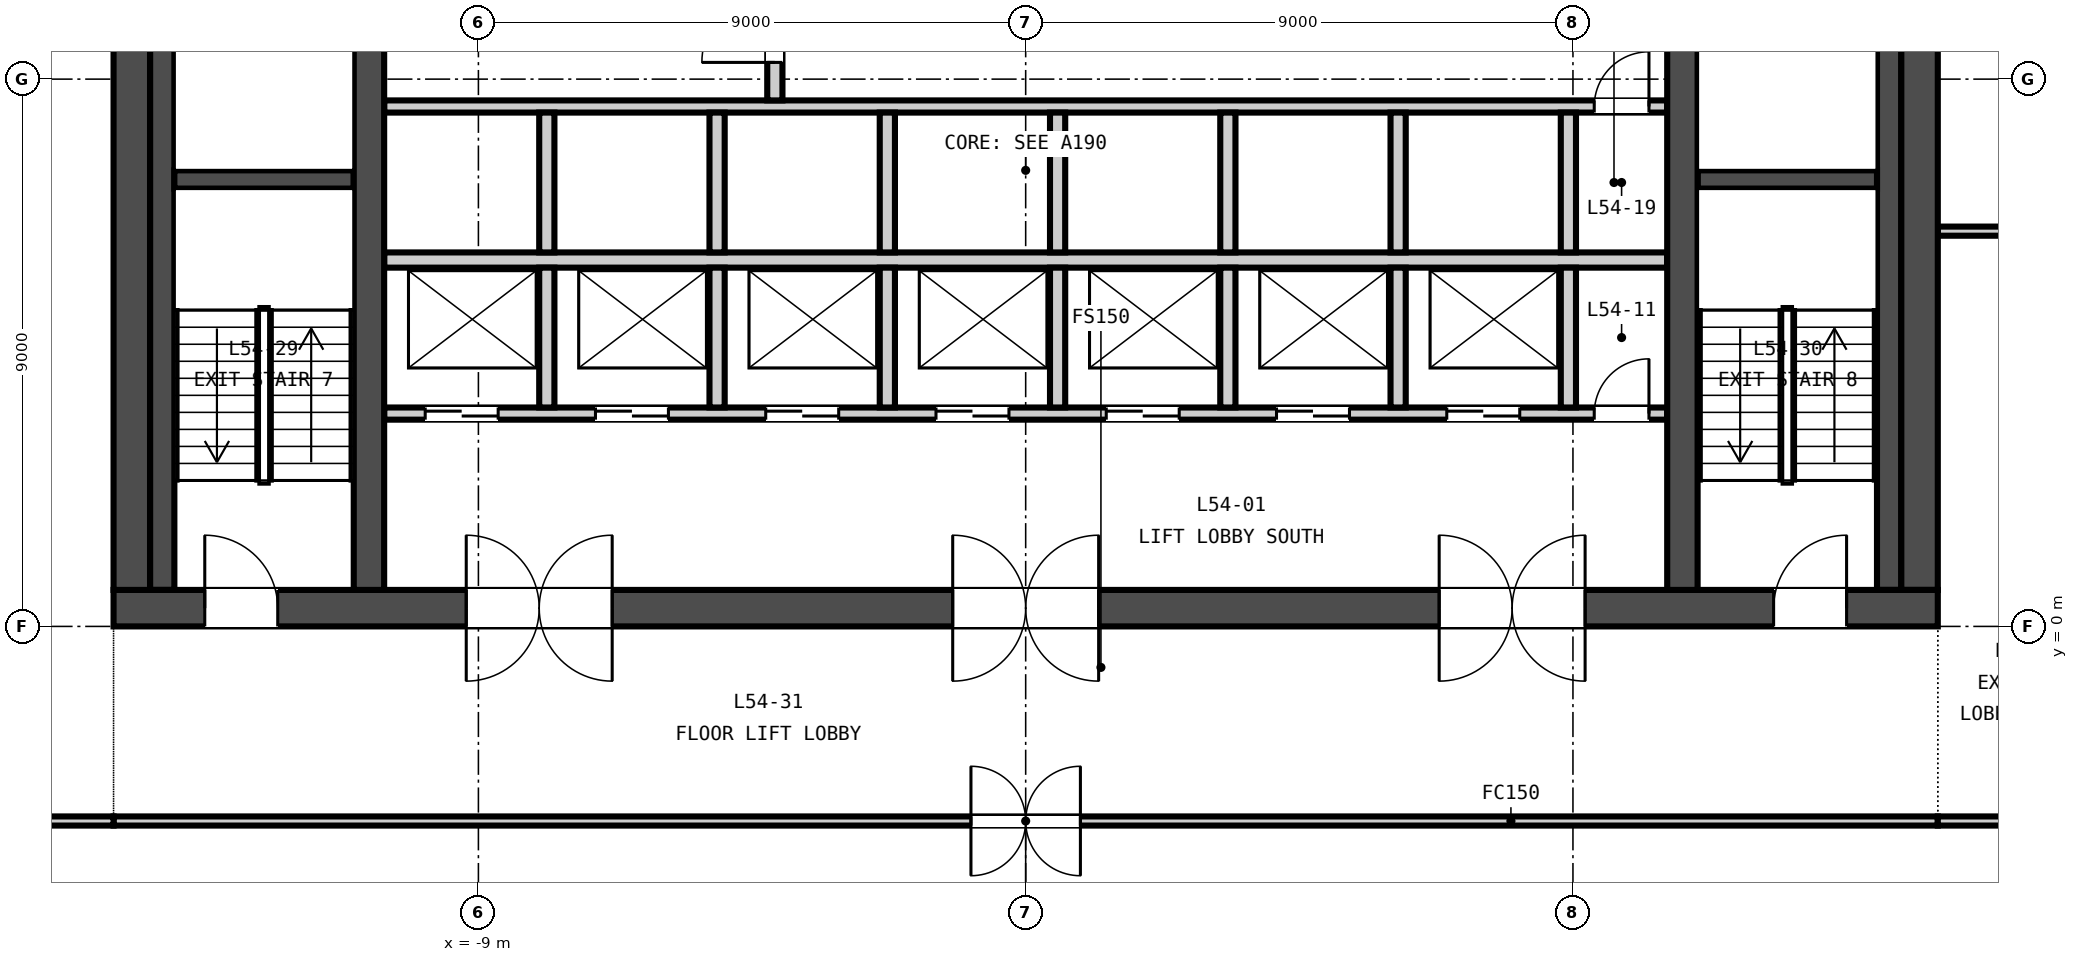
"""IFC4 building model, lengths in metres.
Left out: names, types, materials, properties, quantities, classifications, styles, units other than length and angle.
Written with IfcOpenShell. Run it as: python <this file> out.ifc"""

import sys

from ifc_helpers import new_model, si_unit, direction, frame, frame_2d, origin, place, context, subcontext, project, spatial, rectangle, extrude, element, fill, save


model = new_model("IFC4")
c1 = context("Model", 3, precision=1e-05, world=origin(), true_north=direction((0.0, 1.0)))
c2 = subcontext(c1, "Body", "Model", "MODEL_VIEW")
j1 = project(units=[si_unit("LENGTHUNIT", "METRE"), si_unit("PLANEANGLEUNIT", "RADIAN")], contexts=[c1])
p1 = place(None, origin())
s1 = spatial("IfcSite", under=j1, at=p1, CompositionType="ELEMENT")
p2 = place(p1, origin())
s2 = spatial("IfcBuilding", under=s1, at=p2, CompositionType="ELEMENT")
p3 = place(p2, frame((0.0, 0.0, 216.3)))
s3 = spatial("IfcBuildingStorey", under=s2, at=p3, CompositionType="ELEMENT", Elevation=216.3)
p4 = place(p3, frame((-15.0, 0.3, -0.15), z_axis=(0.0, 0.0, 1.0), x_axis=(1.0, 0.0, 0.0)))
e1 = element("IfcWall", 1, at=p4, inside=s3, PredefinedType="SOLIDWALL", context=c2, shape_type="SweptSolid", body=[
    extrude(rectangle(XDim=30.0, YDim=0.6, at=frame_2d((15.0, 0.0))), origin(), (0.0, 0.0, 1.0), 3.65),
])
p5 = place(p4, frame((5.8, 0.0, 0.15)))
e2 = element("IfcOpeningElement", 2, at=p5, cuts=e1, PredefinedType="OPENING", context=c2, shape_type="SweptSolid", body=[
    extrude(rectangle(XDim=2.4, YDim=2.4, at=frame_2d((1.2, 1.2))), frame((0.0, 0.31, 0.0), z_axis=(0.0, -1.0, 0.0), x_axis=(1.0, 0.0, 0.0)), (0.0, 0.0, 1.0), 0.62),
])
p6 = place(p4, frame((13.8, 0.0, 0.15)))
e3 = element("IfcOpeningElement", 3, at=p6, cuts=e1, PredefinedType="OPENING", context=c2, shape_type="SweptSolid", body=[
    extrude(rectangle(XDim=2.4, YDim=2.4, at=frame_2d((1.2, 1.2))), frame((0.0, 0.31, 0.0), z_axis=(0.0, -1.0, 0.0), x_axis=(1.0, 0.0, 0.0)), (0.0, 0.0, 1.0), 0.62),
])
p7 = place(p4, frame((21.8, 0.0, 0.15)))
e4 = element("IfcOpeningElement", 4, at=p7, cuts=e1, PredefinedType="OPENING", context=c2, shape_type="SweptSolid", body=[
    extrude(rectangle(XDim=2.4, YDim=2.4, at=frame_2d((1.2, 1.2))), frame((0.0, 0.31, 0.0), z_axis=(0.0, -1.0, 0.0), x_axis=(1.0, 0.0, 0.0)), (0.0, 0.0, 1.0), 0.62),
])
p8 = place(p4, frame((1.5, 0.0, 0.15)))
e5 = element("IfcOpeningElement", 5, at=p8, cuts=e1, PredefinedType="OPENING", context=c2, shape_type="SweptSolid", body=[
    extrude(rectangle(XDim=1.2, YDim=2.1, at=frame_2d((0.6, 1.05))), frame((0.0, 0.31, 0.0), z_axis=(0.0, -1.0, 0.0), x_axis=(1.0, 0.0, 0.0)), (0.0, 0.0, 1.0), 0.62),
])
p9 = place(p4, frame((27.3, 0.0, 0.15)))
e6 = element("IfcOpeningElement", 6, at=p9, cuts=e1, PredefinedType="OPENING", context=c2, shape_type="SweptSolid", body=[
    extrude(rectangle(XDim=1.2, YDim=2.1, at=frame_2d((0.6, 1.05))), frame((0.0, 0.31, 0.0), z_axis=(0.0, -1.0, 0.0), x_axis=(1.0, 0.0, 0.0)), (0.0, 0.0, 1.0), 0.62),
])
for number, where, z_axis, x_axis in (
    (7, (-14.7, 0.6, -0.15), (0.0, 0.0, 1.0), (0.0, 1.0, 0.0)),
    (8, (14.7, 0.6, -0.15), (0.0, 0.0, 1.0), (0.0, 1.0, 0.0)),
):
    element("IfcWall", number, at=place(p3, frame(where, z_axis=z_axis, x_axis=x_axis)), inside=s3, PredefinedType="SOLIDWALL", context=c2, shape_type="SweptSolid", body=[
        extrude(rectangle(XDim=13.8, YDim=0.6, at=frame_2d((6.9, 0.0))), origin(), (0.0, 0.0, 1.0), 3.65),
    ])
for number, where, z_axis, x_axis in (
    (9, (-10.8, 0.6, -0.15), (0.0, 0.0, 1.0), (0.0, 1.0, 0.0)),
    (10, (10.8, 0.6, -0.15), (0.0, 0.0, 1.0), (0.0, 1.0, 0.0)),
):
    element("IfcWall", number, at=place(p3, frame(where, z_axis=z_axis, x_axis=x_axis)), inside=s3, PredefinedType="SOLIDWALL", context=c2, shape_type="SweptSolid", body=[
        extrude(rectangle(XDim=13.8, YDim=0.5, at=frame_2d((6.9, 0.0))), origin(), (0.0, 0.0, 1.0), 3.65),
    ])
p10 = place(p3, frame((-10.55, 3.5, 0.0), z_axis=(0.0, 0.0, 1.0), x_axis=(1.0, 0.0, 0.0)))
e11 = element("IfcWall", 11, at=p10, inside=s3, PredefinedType="PARTITIONING", context=c2, shape_type="SweptSolid", body=[
    extrude(rectangle(XDim=21.1, YDim=0.2, at=frame_2d((10.55, 0.0))), origin(), (0.0, 0.0, 1.0), 3.5),
])
p11 = place(p10, frame((0.675, 0.0, 0.0)))
e12 = element("IfcOpeningElement", 12, at=p11, cuts=e11, PredefinedType="OPENING", context=c2, shape_type="SweptSolid", body=[
    extrude(rectangle(XDim=1.2, YDim=2.1, at=frame_2d((0.6, 1.05))), frame((0.0, 0.11, 0.0), z_axis=(0.0, -1.0, 0.0), x_axis=(1.0, 0.0, 0.0)), (0.0, 0.0, 1.0), 0.22),
])
p12 = place(p10, frame((3.475, 0.0, 0.0)))
e13 = element("IfcOpeningElement", 13, at=p12, cuts=e11, PredefinedType="OPENING", context=c2, shape_type="SweptSolid", body=[
    extrude(rectangle(XDim=1.2, YDim=2.1, at=frame_2d((0.6, 1.05))), frame((0.0, 0.11, 0.0), z_axis=(0.0, -1.0, 0.0), x_axis=(1.0, 0.0, 0.0)), (0.0, 0.0, 1.0), 0.22),
])
p13 = place(p10, frame((6.275, 0.0, 0.0)))
e14 = element("IfcOpeningElement", 14, at=p13, cuts=e11, PredefinedType="OPENING", context=c2, shape_type="SweptSolid", body=[
    extrude(rectangle(XDim=1.2, YDim=2.1, at=frame_2d((0.6, 1.05))), frame((0.0, 0.11, 0.0), z_axis=(0.0, -1.0, 0.0), x_axis=(1.0, 0.0, 0.0)), (0.0, 0.0, 1.0), 0.22),
])
p14 = place(p10, frame((9.075, 0.0, 0.0)))
e15 = element("IfcOpeningElement", 15, at=p14, cuts=e11, PredefinedType="OPENING", context=c2, shape_type="SweptSolid", body=[
    extrude(rectangle(XDim=1.2, YDim=2.1, at=frame_2d((0.6, 1.05))), frame((0.0, 0.11, 0.0), z_axis=(0.0, -1.0, 0.0), x_axis=(1.0, 0.0, 0.0)), (0.0, 0.0, 1.0), 0.22),
])
p15 = place(p10, frame((11.875, 0.0, 0.0)))
e16 = element("IfcOpeningElement", 16, at=p15, cuts=e11, PredefinedType="OPENING", context=c2, shape_type="SweptSolid", body=[
    extrude(rectangle(XDim=1.2, YDim=2.1, at=frame_2d((0.6, 1.05))), frame((0.0, 0.11, 0.0), z_axis=(0.0, -1.0, 0.0), x_axis=(1.0, 0.0, 0.0)), (0.0, 0.0, 1.0), 0.22),
])
p16 = place(p10, frame((14.675, 0.0, 0.0)))
e17 = element("IfcOpeningElement", 17, at=p16, cuts=e11, PredefinedType="OPENING", context=c2, shape_type="SweptSolid", body=[
    extrude(rectangle(XDim=1.2, YDim=2.1, at=frame_2d((0.6, 1.05))), frame((0.0, 0.11, 0.0), z_axis=(0.0, -1.0, 0.0), x_axis=(1.0, 0.0, 0.0)), (0.0, 0.0, 1.0), 0.22),
])
p17 = place(p10, frame((17.475, 0.0, 0.0)))
e18 = element("IfcOpeningElement", 18, at=p17, cuts=e11, PredefinedType="OPENING", context=c2, shape_type="SweptSolid", body=[
    extrude(rectangle(XDim=1.2, YDim=2.1, at=frame_2d((0.6, 1.05))), frame((0.0, 0.11, 0.0), z_axis=(0.0, -1.0, 0.0), x_axis=(1.0, 0.0, 0.0)), (0.0, 0.0, 1.0), 0.22),
])
p18 = place(p10, frame((19.9, 0.0, 0.0)))
e19 = element("IfcOpeningElement", 19, at=p18, cuts=e11, PredefinedType="OPENING", context=c2, shape_type="SweptSolid", body=[
    extrude(rectangle(XDim=0.9, YDim=2.1, at=frame_2d((0.45, 1.05))), frame((0.0, 0.11, 0.0), z_axis=(0.0, -1.0, 0.0), x_axis=(1.0, 0.0, 0.0)), (0.0, 0.0, 1.0), 0.22),
])
p19 = place(p3, frame((-10.55, 6.025, 0.0), z_axis=(0.0, 0.0, 1.0), x_axis=(1.0, 0.0, 0.0)))
e20 = element("IfcWall", 20, at=p19, inside=s3, PredefinedType="PARTITIONING", context=c2, shape_type="SweptSolid", body=[
    extrude(rectangle(XDim=21.1, YDim=0.25, at=frame_2d((10.55, 0.0))), origin(), (0.0, 0.0, 1.0), 3.5),
])
p20 = place(p3, frame((-10.55, 8.55, 0.0), z_axis=(0.0, 0.0, 1.0), x_axis=(1.0, 0.0, 0.0)))
e21 = element("IfcWall", 21, at=p20, inside=s3, PredefinedType="PARTITIONING", context=c2, shape_type="SweptSolid", body=[
    extrude(rectangle(XDim=21.1, YDim=0.2, at=frame_2d((10.55, 0.0))), origin(), (0.0, 0.0, 1.0), 3.5),
])
p21 = place(p20, frame((19.9, 0.0, 0.0)))
e22 = element("IfcOpeningElement", 22, at=p21, cuts=e21, PredefinedType="OPENING", context=c2, shape_type="SweptSolid", body=[
    extrude(rectangle(XDim=0.9, YDim=2.1, at=frame_2d((0.45, 1.05))), frame((0.0, 0.11, 0.0), z_axis=(0.0, -1.0, 0.0), x_axis=(1.0, 0.0, 0.0)), (0.0, 0.0, 1.0), 0.22),
])
p22 = place(p3, frame((-4.125, 8.65, 0.0), z_axis=(0.0, 0.0, 1.0), x_axis=(0.0, 1.0, 0.0)))
e23 = element("IfcWall", 23, at=p22, inside=s3, PredefinedType="PARTITIONING", context=c2, shape_type="SweptSolid", body=[
    extrude(rectangle(XDim=2.45, YDim=0.25, at=frame_2d((1.225, 0.0))), origin(), (0.0, 0.0, 1.0), 3.5),
])
p23 = place(p22, frame((0.625, 0.0, 0.0)))
e24 = element("IfcOpeningElement", 24, at=p23, cuts=e23, PredefinedType="OPENING", context=c2, shape_type="SweptSolid", body=[
    extrude(rectangle(XDim=1.2, YDim=2.1, at=frame_2d((0.6, 1.05))), frame((0.0, 0.135, 0.0), z_axis=(0.0, -1.0, 0.0), x_axis=(1.0, 0.0, 0.0)), (0.0, 0.0, 1.0), 0.27),
])
for number, where, z_axis, x_axis in (
    (25, (-7.875, 3.6, 0.0), (0.0, 0.0, 1.0), (0.0, 1.0, 0.0)),
    (26, (-5.075, 3.6, 0.0), (0.0, 0.0, 1.0), (0.0, 1.0, 0.0)),
    (27, (-2.275, 3.6, 0.0), (0.0, 0.0, 1.0), (0.0, 1.0, 0.0)),
    (28, (0.525, 3.6, 0.0), (0.0, 0.0, 1.0), (0.0, 1.0, 0.0)),
    (29, (3.325, 3.6, 0.0), (0.0, 0.0, 1.0), (0.0, 1.0, 0.0)),
    (30, (6.125, 3.6, 0.0), (0.0, 0.0, 1.0), (0.0, 1.0, 0.0)),
    (31, (8.925, 3.6, 0.0), (0.0, 0.0, 1.0), (0.0, 1.0, 0.0)),
):
    element("IfcWall", number, at=place(p3, frame(where, z_axis=z_axis, x_axis=x_axis)), inside=s3, PredefinedType="PARTITIONING", context=c2, shape_type="SweptSolid", body=[
        extrude(rectangle(XDim=2.3, YDim=0.25, at=frame_2d((1.15, 0.0))), origin(), (0.0, 0.0, 1.0), 3.5),
    ])
for number, where, z_axis, x_axis in (
    (32, (-7.875, 6.15, 0.0), (0.0, 0.0, 1.0), (0.0, 1.0, 0.0)),
    (33, (-5.075, 6.15, 0.0), (0.0, 0.0, 1.0), (0.0, 1.0, 0.0)),
    (34, (-2.275, 6.15, 0.0), (0.0, 0.0, 1.0), (0.0, 1.0, 0.0)),
    (35, (0.525, 6.15, 0.0), (0.0, 0.0, 1.0), (0.0, 1.0, 0.0)),
    (36, (3.325, 6.15, 0.0), (0.0, 0.0, 1.0), (0.0, 1.0, 0.0)),
    (37, (6.125, 6.15, 0.0), (0.0, 0.0, 1.0), (0.0, 1.0, 0.0)),
    (38, (8.925, 6.15, 0.0), (0.0, 0.0, 1.0), (0.0, 1.0, 0.0)),
):
    element("IfcWall", number, at=place(p3, frame(where, z_axis=z_axis, x_axis=x_axis)), inside=s3, PredefinedType="PARTITIONING", context=c2, shape_type="SweptSolid", body=[
        extrude(rectangle(XDim=2.3, YDim=0.25, at=frame_2d((1.15, 0.0))), origin(), (0.0, 0.0, 1.0), 3.5),
    ])
p24 = place(p3, frame((-14.0, 7.35, 0.0), z_axis=(0.0, 0.0, 1.0), x_axis=(1.0, 0.0, 0.0)))
e39 = element("IfcWall", 39, at=p24, inside=s3, PredefinedType="SOLIDWALL", context=c2, shape_type="SweptSolid", body=[
    extrude(rectangle(XDim=2.95, YDim=0.3, at=frame_2d((1.475, 0.0))), origin(), (0.0, 0.0, 1.0), 3.5),
])
p25 = place(p3, frame((-14.2, 0.6, 0.0), z_axis=(0.0, 0.0, 1.0), x_axis=(0.0, 1.0, 0.0)))
e40 = element("IfcWall", 40, at=p25, inside=s3, PredefinedType="SOLIDWALL", context=c2, shape_type="SweptSolid", body=[
    extrude(rectangle(XDim=13.8, YDim=0.4, at=frame_2d((6.9, 0.0))), origin(), (0.0, 0.0, 1.0), 3.5),
])
p26 = place(p3, frame((11.05, 7.35, 0.0), z_axis=(0.0, 0.0, 1.0), x_axis=(1.0, 0.0, 0.0)))
e41 = element("IfcWall", 41, at=p26, inside=s3, PredefinedType="SOLIDWALL", context=c2, shape_type="SweptSolid", body=[
    extrude(rectangle(XDim=2.95, YDim=0.3, at=frame_2d((1.475, 0.0))), origin(), (0.0, 0.0, 1.0), 3.5),
])
p27 = place(p3, frame((14.2, 0.6, 0.0), z_axis=(0.0, 0.0, 1.0), x_axis=(0.0, 1.0, 0.0)))
e42 = element("IfcWall", 42, at=p27, inside=s3, PredefinedType="SOLIDWALL", context=c2, shape_type="SweptSolid", body=[
    extrude(rectangle(XDim=13.8, YDim=0.4, at=frame_2d((6.9, 0.0))), origin(), (0.0, 0.0, 1.0), 3.5),
])
p28 = place(p3, frame((15.0, -3.2, 0.0), z_axis=(0.0, 0.0, 1.0), x_axis=(-1.0, 0.0, 0.0)))
e43 = element("IfcWall", 43, at=p28, inside=s3, PredefinedType="PARTITIONING", context=c2, shape_type="SweptSolid", body=[
    extrude(rectangle(XDim=30.0, YDim=0.15, at=frame_2d((15.0, 0.0))), origin(), (0.0, 0.0, 1.0), 2.751),
])
p29 = place(p28, frame((14.1, 0.0, 0.0)))
e44 = element("IfcOpeningElement", 44, at=p29, cuts=e43, PredefinedType="OPENING", context=c2, shape_type="SweptSolid", body=[
    extrude(rectangle(XDim=1.8, YDim=2.1, at=frame_2d((0.9, 1.05))), frame((0.0, 0.085, 0.0), z_axis=(0.0, -1.0, 0.0), x_axis=(1.0, 0.0, 0.0)), (0.0, 0.0, 1.0), 0.17),
])
p30 = place(p3, frame((-15.0, -3.2, 0.0), z_axis=(0.0, 0.0, 1.0), x_axis=(-1.0, 0.0, 0.0)))
e45 = element("IfcWall", 45, at=p30, inside=s3, PredefinedType="PARTITIONING", context=c2, shape_type="SweptSolid", body=[
    extrude(rectangle(XDim=3.0, YDim=0.15, at=frame_2d((1.5, 0.0))), origin(), (0.0, 0.0, 1.0), 2.751),
])
for number, where, z_axis, x_axis in (
    (46, (17.925, -3.2, 0.0), (0.0, 0.0, 1.0), (-1.0, 0.0, 0.0)),
    (47, (15.0, 6.5, 0.0), (0.0, 0.0, 1.0), (1.0, 0.0, 0.0)),
):
    element("IfcWall", number, at=place(p3, frame(where, z_axis=z_axis, x_axis=x_axis)), inside=s3, PredefinedType="PARTITIONING", context=c2, shape_type="SweptSolid", body=[
        extrude(rectangle(XDim=2.925, YDim=0.15, at=frame_2d((1.462, 0.0))), origin(), (0.0, 0.0, 1.0), 2.751),
    ])
p31 = place(p23, origin())
e48 = element("IfcDoor", 48, at=p31, inside=s3, OperationType="SINGLE_SWING_LEFT", PredefinedType="DOOR", context=c2, shape_type="SweptSolid", body=[
    extrude(rectangle(XDim=1.2, YDim=2.1, at=frame_2d((0.6, 1.05))), frame((0.0, 0.025, 0.0), z_axis=(0.0, -1.0, 0.0), x_axis=(1.0, 0.0, 0.0)), (0.0, 0.0, 1.0), 0.05),
])
fill(e24, e48)
p32 = place(p11, origin())
e49 = element("IfcDoor", 49, at=p32, inside=s3, OperationType="DOUBLE_DOOR_SLIDING", PredefinedType="DOOR", context=c2, shape_type="SweptSolid", body=[
    extrude(rectangle(XDim=1.2, YDim=2.1, at=frame_2d((0.6, 1.05))), frame((0.0, 0.025, 0.0), z_axis=(0.0, -1.0, 0.0), x_axis=(1.0, 0.0, 0.0)), (0.0, 0.0, 1.0), 0.05),
])
fill(e12, e49)
p33 = place(p12, origin())
e50 = element("IfcDoor", 50, at=p33, inside=s3, OperationType="DOUBLE_DOOR_SLIDING", PredefinedType="DOOR", context=c2, shape_type="SweptSolid", body=[
    extrude(rectangle(XDim=1.2, YDim=2.1, at=frame_2d((0.6, 1.05))), frame((0.0, 0.025, 0.0), z_axis=(0.0, -1.0, 0.0), x_axis=(1.0, 0.0, 0.0)), (0.0, 0.0, 1.0), 0.05),
])
fill(e13, e50)
p34 = place(p13, origin())
e51 = element("IfcDoor", 51, at=p34, inside=s3, OperationType="DOUBLE_DOOR_SLIDING", PredefinedType="DOOR", context=c2, shape_type="SweptSolid", body=[
    extrude(rectangle(XDim=1.2, YDim=2.1, at=frame_2d((0.6, 1.05))), frame((0.0, 0.025, 0.0), z_axis=(0.0, -1.0, 0.0), x_axis=(1.0, 0.0, 0.0)), (0.0, 0.0, 1.0), 0.05),
])
fill(e14, e51)
p35 = place(p14, origin())
e52 = element("IfcDoor", 52, at=p35, inside=s3, OperationType="DOUBLE_DOOR_SLIDING", PredefinedType="DOOR", context=c2, shape_type="SweptSolid", body=[
    extrude(rectangle(XDim=1.2, YDim=2.1, at=frame_2d((0.6, 1.05))), frame((0.0, 0.025, 0.0), z_axis=(0.0, -1.0, 0.0), x_axis=(1.0, 0.0, 0.0)), (0.0, 0.0, 1.0), 0.05),
])
fill(e15, e52)
p36 = place(p15, origin())
e53 = element("IfcDoor", 53, at=p36, inside=s3, OperationType="DOUBLE_DOOR_SLIDING", PredefinedType="DOOR", context=c2, shape_type="SweptSolid", body=[
    extrude(rectangle(XDim=1.2, YDim=2.1, at=frame_2d((0.6, 1.05))), frame((0.0, 0.025, 0.0), z_axis=(0.0, -1.0, 0.0), x_axis=(1.0, 0.0, 0.0)), (0.0, 0.0, 1.0), 0.05),
])
fill(e16, e53)
p37 = place(p16, origin())
e54 = element("IfcDoor", 54, at=p37, inside=s3, OperationType="DOUBLE_DOOR_SLIDING", PredefinedType="DOOR", context=c2, shape_type="SweptSolid", body=[
    extrude(rectangle(XDim=1.2, YDim=2.1, at=frame_2d((0.6, 1.05))), frame((0.0, 0.025, 0.0), z_axis=(0.0, -1.0, 0.0), x_axis=(1.0, 0.0, 0.0)), (0.0, 0.0, 1.0), 0.05),
])
fill(e17, e54)
p38 = place(p17, origin())
e55 = element("IfcDoor", 55, at=p38, inside=s3, OperationType="DOUBLE_DOOR_SLIDING", PredefinedType="DOOR", context=c2, shape_type="SweptSolid", body=[
    extrude(rectangle(XDim=1.2, YDim=2.1, at=frame_2d((0.6, 1.05))), frame((0.0, 0.025, 0.0), z_axis=(0.0, -1.0, 0.0), x_axis=(1.0, 0.0, 0.0)), (0.0, 0.0, 1.0), 0.05),
])
fill(e18, e55)
p39 = place(p18, origin())
e56 = element("IfcDoor", 56, at=p39, inside=s3, OperationType="SINGLE_SWING_RIGHT", PredefinedType="DOOR", context=c2, shape_type="SweptSolid", body=[
    extrude(rectangle(XDim=0.9, YDim=2.1, at=frame_2d((0.45, 1.05))), frame((0.0, 0.025, 0.0), z_axis=(0.0, -1.0, 0.0), x_axis=(1.0, 0.0, 0.0)), (0.0, 0.0, 1.0), 0.05),
])
fill(e19, e56)
p40 = place(p21, origin())
e57 = element("IfcDoor", 57, at=p40, inside=s3, OperationType="SINGLE_SWING_RIGHT", PredefinedType="DOOR", context=c2, shape_type="SweptSolid", body=[
    extrude(rectangle(XDim=0.9, YDim=2.1, at=frame_2d((0.45, 1.05))), frame((0.0, 0.025, 0.0), z_axis=(0.0, -1.0, 0.0), x_axis=(1.0, 0.0, 0.0)), (0.0, 0.0, 1.0), 0.05),
])
fill(e22, e57)
p41 = place(p5, origin())
e58 = element("IfcDoor", 58, at=p41, inside=s3, OperationType="DOUBLE_DOOR_DOUBLE_SWING", PredefinedType="DOOR", context=c2, shape_type="SweptSolid", body=[
    extrude(rectangle(XDim=2.4, YDim=2.4, at=frame_2d((1.2, 1.2))), frame((0.0, 0.025, 0.0), z_axis=(0.0, -1.0, 0.0), x_axis=(1.0, 0.0, 0.0)), (0.0, 0.0, 1.0), 0.05),
])
fill(e2, e58)
p42 = place(p6, origin())
e59 = element("IfcDoor", 59, at=p42, inside=s3, OperationType="DOUBLE_DOOR_DOUBLE_SWING", PredefinedType="DOOR", context=c2, shape_type="SweptSolid", body=[
    extrude(rectangle(XDim=2.4, YDim=2.4, at=frame_2d((1.2, 1.2))), frame((0.0, 0.025, 0.0), z_axis=(0.0, -1.0, 0.0), x_axis=(1.0, 0.0, 0.0)), (0.0, 0.0, 1.0), 0.05),
])
fill(e3, e59)
p43 = place(p7, origin())
e60 = element("IfcDoor", 60, at=p43, inside=s3, OperationType="DOUBLE_DOOR_DOUBLE_SWING", PredefinedType="DOOR", context=c2, shape_type="SweptSolid", body=[
    extrude(rectangle(XDim=2.4, YDim=2.4, at=frame_2d((1.2, 1.2))), frame((0.0, 0.025, 0.0), z_axis=(0.0, -1.0, 0.0), x_axis=(1.0, 0.0, 0.0)), (0.0, 0.0, 1.0), 0.05),
])
fill(e4, e60)
p44 = place(p8, origin())
e61 = element("IfcDoor", 61, at=p44, inside=s3, OperationType="SINGLE_SWING_LEFT", PredefinedType="DOOR", context=c2, shape_type="SweptSolid", body=[
    extrude(rectangle(XDim=1.2, YDim=2.1, at=frame_2d((0.6, 1.05))), frame((0.0, 0.025, 0.0), z_axis=(0.0, -1.0, 0.0), x_axis=(1.0, 0.0, 0.0)), (0.0, 0.0, 1.0), 0.05),
])
fill(e5, e61)
p45 = place(p9, origin())
e62 = element("IfcDoor", 62, at=p45, inside=s3, OperationType="SINGLE_SWING_RIGHT", PredefinedType="DOOR", context=c2, shape_type="SweptSolid", body=[
    extrude(rectangle(XDim=1.2, YDim=2.1, at=frame_2d((0.6, 1.05))), frame((0.0, 0.025, 0.0), z_axis=(0.0, -1.0, 0.0), x_axis=(1.0, 0.0, 0.0)), (0.0, 0.0, 1.0), 0.05),
])
fill(e6, e62)
p46 = place(p29, origin())
e63 = element("IfcDoor", 63, at=p46, inside=s3, OperationType="DOUBLE_DOOR_DOUBLE_SWING", PredefinedType="DOOR", context=c2, shape_type="SweptSolid", body=[
    extrude(rectangle(XDim=1.8, YDim=2.1, at=frame_2d((0.9, 1.05))), frame((0.0, 0.025, 0.0), z_axis=(0.0, -1.0, 0.0), x_axis=(1.0, 0.0, 0.0)), (0.0, 0.0, 1.0), 0.05),
])
fill(e44, e63)
save(model, sys.argv[1])
